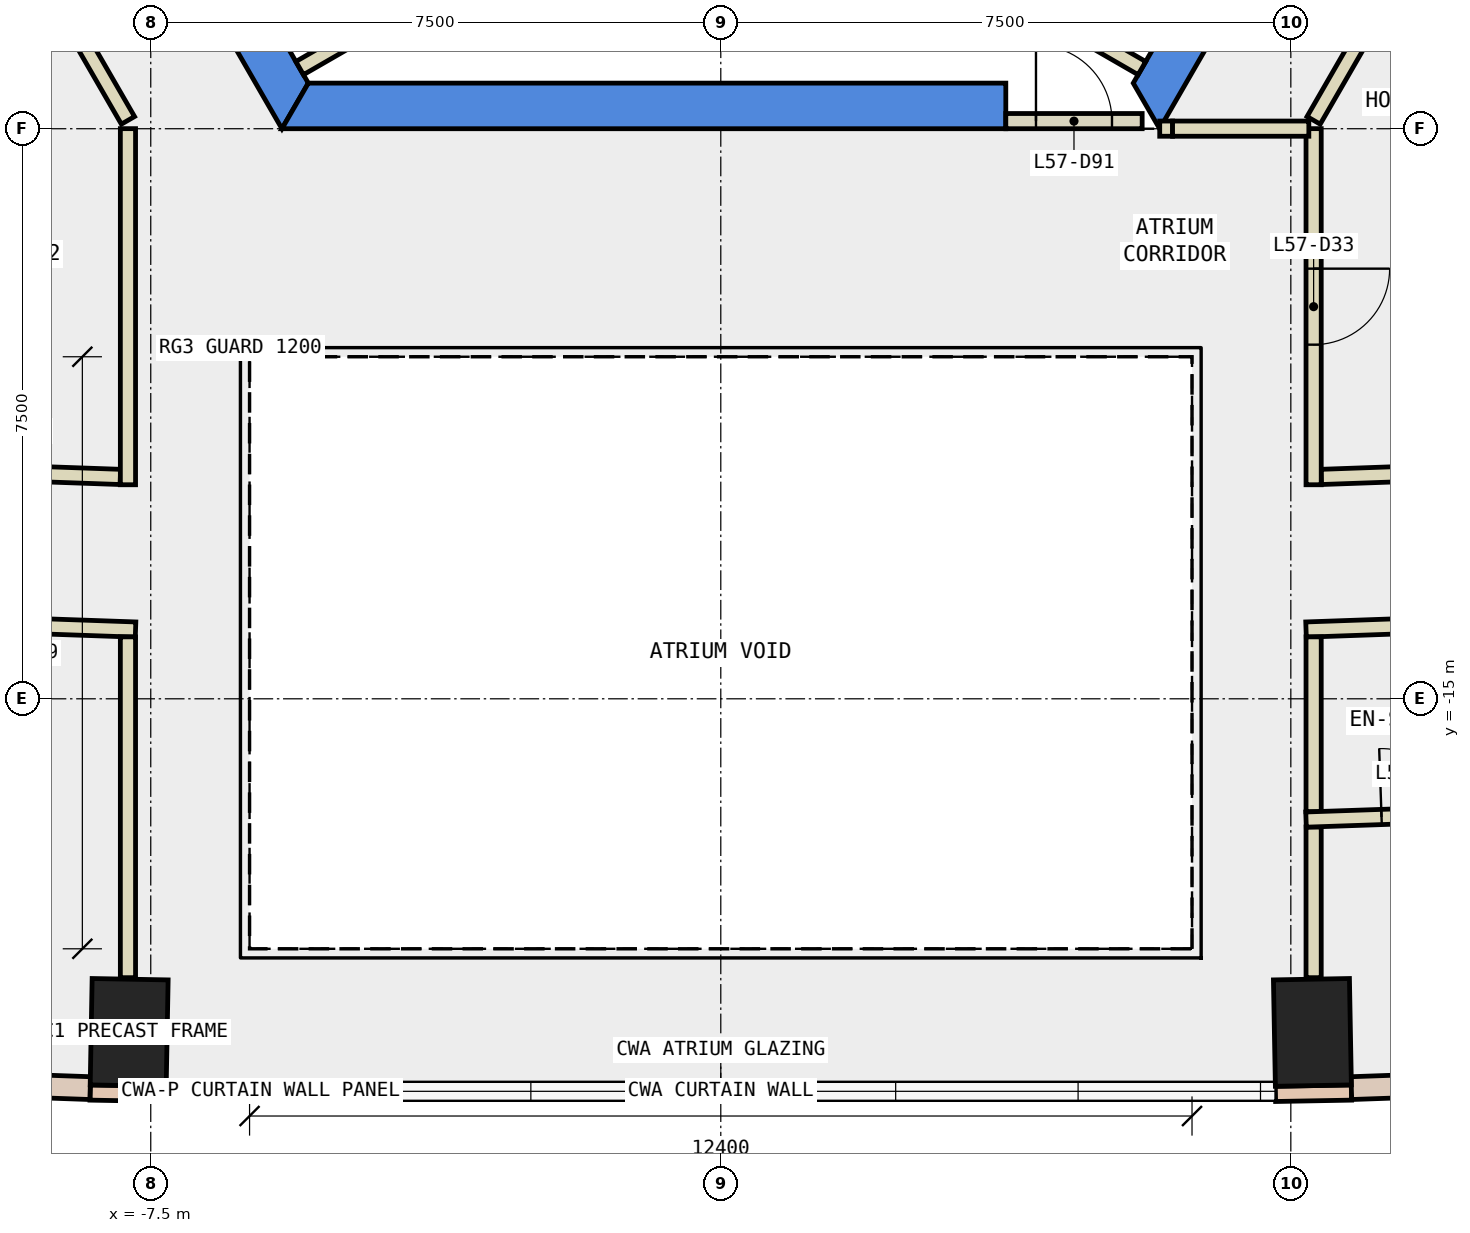
"""IFC4 building model, lengths in metres.
Left out: names, types, materials, properties, quantities, classifications, styles, units other than length and angle.
Written with IfcOpenShell. Run it as: python <this file> out.ifc"""

import sys

from ifc_helpers import new_model, si_unit, direction, frame, frame_2d, origin, origin_2d, place, context, subcontext, project, spatial, polyline, rectangle, outline, extrude, element, fill, save


model = new_model("IFC4")
c1 = context("Model", 3, precision=1e-05, world=origin(), true_north=direction((0.0, 1.0)))
c2 = subcontext(c1, "Body", "Model", "MODEL_VIEW")
j1 = project(units=[si_unit("LENGTHUNIT", "METRE"), si_unit("PLANEANGLEUNIT", "RADIAN")], contexts=[c1])
p1 = place(None, origin())
s1 = spatial("IfcSite", under=j1, at=p1, CompositionType="ELEMENT")
p2 = place(p1, origin())
s2 = spatial("IfcBuilding", under=s1, at=p2, CompositionType="ELEMENT")
p3 = place(p2, frame((0.0, 0.0, 252.2)))
s3 = spatial("IfcBuildingStorey", under=s2, at=p3, CompositionType="ELEMENT", Elevation=252.2)
for number, where, z_axis, x_axis in (
    (1, (-7.784, -19.389, -0.34), (0.0, 0.0, 1.0), (-1.0, 0.018, 0.0)),
    (2, (7.784, -19.389, -0.34), (0.0, 0.0, 1.0), (1.0, 0.018, 0.0)),
):
    element("IfcColumn", number, at=place(p3, frame(where, z_axis=z_axis, x_axis=x_axis)), inside=s3, PredefinedType="COLUMN", context=c2, shape_type="SweptSolid", body=[
        extrude(rectangle(XDim=1.0, YDim=1.4, at=origin_2d()), origin(), (0.0, 0.0, 1.0), 3.6),
    ])
p4 = place(p3, frame((0.0, 0.0, -0.34)))
e3 = element("IfcWall", 3, at=p4, inside=s3, PredefinedType="SHEAR", context=c2, shape_type="SweptSolid", body=[
    extrude(outline(polyline([(-11.547, 2.5), (-5.774, -7.5), (-5.427, -6.9), (-10.854, 2.5), (-11.547, 2.5)])), origin(), (0.0, 0.0, 1.0), 3.6),
])
p5 = place(p3, frame((0.0, 0.0, -0.34)))
e4 = element("IfcWall", 4, at=p5, inside=s3, PredefinedType="SHEAR", context=c2, shape_type="SweptSolid", body=[
    extrude(outline(polyline([(3.75, -7.5), (3.75, -6.9), (-5.427, -6.9), (-5.774, -7.5), (3.75, -7.5)])), origin(), (0.0, 0.0, 1.0), 3.6),
])
p6 = place(p3, frame((0.0, 0.0, -0.34)))
e5 = element("IfcWall", 5, at=p6, inside=s3, PredefinedType="SHEAR", context=c2, shape_type="SweptSolid", body=[
    extrude(outline(polyline([(5.774, -7.5), (11.547, 2.5), (10.854, 2.5), (5.427, -6.9), (5.774, -7.5)])), origin(), (0.0, 0.0, 1.0), 3.6),
])
for number, where, z_axis, x_axis in (
    (6, (7.578, -4.375, -0.34), (0.0, 0.0, 1.0), (0.866, -0.5, 0.0)),
    (7, (-7.578, -4.375, -0.34), (0.0, 0.0, 1.0), (-0.866, -0.5, 0.0)),
):
    element("IfcWall", number, at=place(p3, frame(where, z_axis=z_axis, x_axis=x_axis)), inside=s3, PredefinedType="SHEAR", context=c2, shape_type="SweptSolid", body=[
        extrude(rectangle(XDim=9.0, YDim=0.8, at=frame_2d((4.5, 0.0))), origin(), (0.0, 0.0, 1.0), 3.6),
    ])
for number, where, z_axis, x_axis in (
    (8, (-8.298, -20.18, 0.0), (0.0, 0.0, 1.0), (1.0, -0.018, 0.0)),
    (9, (7.298, -20.198, 0.0), (0.0, 0.0, 1.0), (1.0, 0.018, 0.0)),
):
    element("IfcWall", number, at=place(p3, frame(where, z_axis=z_axis, x_axis=x_axis)), inside=s3, PredefinedType="STANDARD", context=c2, shape_type="SweptSolid", body=[
        extrude(rectangle(XDim=1.0, YDim=0.2, at=frame_2d((0.5, 0.0))), origin(), (0.0, 0.0, 1.0), 3.26),
    ])
p7 = place(p3, frame((-15.952, -19.854, 0.0), z_axis=(0.0, 0.0, 1.0), x_axis=(0.999387577449, -0.034992428331, 0.0)))
e10 = element("IfcWall", 10, at=p7, inside=s3, PredefinedType="STANDARD", context=c2, shape_type="SweptSolid", body=[
    extrude(rectangle(XDim=7.661, YDim=0.3, at=frame_2d((3.83, 0.0))), origin(), (0.0, 0.0, 1.0), 3.26),
])
p8 = place(p7, frame((0.815, 0.0, 0.9)))
e11 = element("IfcOpeningElement", 11, at=p8, cuts=e10, PredefinedType="OPENING", context=c2, shape_type="SweptSolid", body=[
    extrude(rectangle(XDim=2.2, YDim=2.0, at=frame_2d((1.1, 1.0))), frame((0.0, 0.16, 0.0), z_axis=(0.0, -1.0, 0.0), x_axis=(1.0, 0.0, 0.0)), (0.0, 0.0, 1.0), 0.32),
])
p9 = place(p7, frame((4.646, 0.0, 0.9)))
e12 = element("IfcOpeningElement", 12, at=p9, cuts=e10, PredefinedType="OPENING", context=c2, shape_type="SweptSolid", body=[
    extrude(rectangle(XDim=2.2, YDim=2.0, at=frame_2d((1.1, 1.0))), frame((0.0, 0.16, 0.0), z_axis=(0.0, -1.0, 0.0), x_axis=(1.0, 0.0, 0.0)), (0.0, 0.0, 1.0), 0.32),
])
p10 = place(p3, frame((8.296, -20.122, 0.0), z_axis=(0.0, 0.0, 1.0), x_axis=(0.999387577449, 0.034992428331, 0.0)))
e13 = element("IfcWall", 13, at=p10, inside=s3, PredefinedType="STANDARD", context=c2, shape_type="SweptSolid", body=[
    extrude(rectangle(XDim=7.661, YDim=0.3, at=frame_2d((3.83, 0.0))), origin(), (0.0, 0.0, 1.0), 3.26),
])
p11 = place(p10, frame((0.815, 0.0, 0.9)))
e14 = element("IfcOpeningElement", 14, at=p11, cuts=e13, PredefinedType="OPENING", context=c2, shape_type="SweptSolid", body=[
    extrude(rectangle(XDim=2.2, YDim=2.0, at=frame_2d((1.1, 1.0))), frame((0.0, 0.16, 0.0), z_axis=(0.0, -1.0, 0.0), x_axis=(1.0, 0.0, 0.0)), (0.0, 0.0, 1.0), 0.32),
])
p12 = place(p10, frame((4.646, 0.0, 0.9)))
e15 = element("IfcOpeningElement", 15, at=p12, cuts=e13, PredefinedType="OPENING", context=c2, shape_type="SweptSolid", body=[
    extrude(rectangle(XDim=2.2, YDim=2.0, at=frame_2d((1.1, 1.0))), frame((0.0, 0.16, 0.0), z_axis=(0.0, -1.0, 0.0), x_axis=(1.0, 0.0, 0.0)), (0.0, 0.0, 1.0), 0.32),
])
p13 = place(p3, frame((7.9, -12.081, 0.0), z_axis=(0.0, 0.0, 1.0), x_axis=(0.999365240621, 0.035624652105, 0.0)))
e16 = element("IfcWall", 16, at=p13, inside=s3, PredefinedType="PARTITIONING", context=c2, shape_type="SweptSolid", body=[
    extrude(rectangle(XDim=1.042, YDim=0.2, at=frame_2d((0.521, 0.0))), origin(), (0.0, 0.0, 1.0), 3.26),
])
p14 = place(p3, frame((-7.8, -7.39, 0.0), z_axis=(0.0, 0.0, 1.0), x_axis=(-0.500266477503, 0.865871498253, 0.0)))
e17 = element("IfcWall", 17, at=p14, inside=s3, PredefinedType="PARTITIONING", context=c2, shape_type="SweptSolid", body=[
    extrude(rectangle(XDim=1.463, YDim=0.2, at=frame_2d((0.731, 0.0))), origin(), (0.0, 0.0, 1.0), 3.26),
])
p15 = place(p3, frame((-10.826, -11.978, 0.0), z_axis=(0.0, 0.0, 1.0), x_axis=(0.999380679818, -0.035188873332, 0.0)))
e18 = element("IfcWall", 18, at=p15, inside=s3, PredefinedType="PARTITIONING", context=c2, shape_type="SweptSolid", body=[
    extrude(rectangle(XDim=2.928, YDim=0.2, at=frame_2d((1.464, 0.0))), origin(), (0.0, 0.0, 1.0), 3.26),
])
p16 = place(p15, frame((0.964, 0.0, 0.0)))
e19 = element("IfcOpeningElement", 19, at=p16, cuts=e18, PredefinedType="OPENING", context=c2, shape_type="SweptSolid", body=[
    extrude(rectangle(XDim=1.0, YDim=2.1, at=frame_2d((0.5, 1.05))), frame((0.0, 0.11, 0.0), z_axis=(0.0, -1.0, 0.0), x_axis=(1.0, 0.0, 0.0)), (0.0, 0.0, 1.0), 0.22),
])
p17 = place(p3, frame((10.298, -13.998, 0.0), z_axis=(0.0, 0.0, 1.0), x_axis=(-0.999386321032, -0.035028293342, 0.0)))
e20 = element("IfcWall", 20, at=p17, inside=s3, PredefinedType="PARTITIONING", context=c2, shape_type="SweptSolid", body=[
    extrude(rectangle(XDim=2.6, YDim=0.2, at=frame_2d((1.3, 0.0))), origin(), (0.0, 0.0, 1.0), 3.26),
])
p18 = place(p3, frame((-7.7, -14.089, 0.0), z_axis=(0.0, 0.0, 1.0), x_axis=(-0.999388410674, 0.034968623214, 0.0)))
e21 = element("IfcWall", 21, at=p18, inside=s3, PredefinedType="PARTITIONING", context=c2, shape_type="SweptSolid", body=[
    extrude(rectangle(XDim=5.264, YDim=0.2, at=frame_2d((2.632, 0.0))), origin(), (0.0, 0.0, 1.0), 3.26),
])
p19 = place(p18, frame((2.182, 0.0, 0.0)))
e22 = element("IfcOpeningElement", 22, at=p19, cuts=e21, PredefinedType="OPENING", context=c2, shape_type="SweptSolid", body=[
    extrude(rectangle(XDim=1.0, YDim=2.1, at=frame_2d((0.5, 1.05))), frame((0.0, 0.11, 0.0), z_axis=(0.0, -1.0, 0.0), x_axis=(1.0, 0.0, 0.0)), (0.0, 0.0, 1.0), 0.22),
])
for number, where, z_axis, x_axis in (
    (23, (5.541, -6.703, 0.0), (0.0, 0.0, 1.0), (-0.866, 0.5, 0.0)),
    (24, (-4.588, -6.153, 0.0), (0.0, 0.0, 1.0), (-0.866, -0.5, 0.0)),
):
    element("IfcWall", number, at=place(p3, frame(where, z_axis=z_axis, x_axis=x_axis)), inside=s3, PredefinedType="PARTITIONING", context=c2, shape_type="SweptSolid", body=[
        extrude(rectangle(XDim=1.1, YDim=0.2, at=frame_2d((0.55, 0.0))), origin(), (0.0, 0.0, 1.0), 3.26),
    ])
p20 = place(p3, frame((5.775, -7.499, 0.0), z_axis=(0.0, 0.0, 1.0), x_axis=(1.0, 0.0, 0.0)))
e25 = element("IfcWall", 25, at=p20, inside=s3, PredefinedType="PARTITIONING", context=c2, shape_type="SweptSolid", body=[
    extrude(rectangle(XDim=0.169, YDim=0.2, at=frame_2d((0.084, 0.0))), origin(), (0.0, 0.0, 1.0), 2.4),
])
p21 = place(p3, frame((7.8, -7.39, 0.0), z_axis=(0.0, 0.0, 1.0), x_axis=(0.499977374825, 0.866038466041, 0.0)))
e26 = element("IfcWall", 26, at=p21, inside=s3, PredefinedType="PARTITIONING", context=c2, shape_type="SweptSolid", body=[
    extrude(rectangle(XDim=2.1, YDim=0.2, at=frame_2d((1.05, 0.0))), origin(), (0.0, 0.0, 1.0), 3.26),
])
p22 = place(p3, frame((7.8, -7.499, 0.0), z_axis=(0.0, 0.0, 1.0), x_axis=(0.0, -1.0, 0.0)))
e27 = element("IfcWall", 27, at=p22, inside=s3, PredefinedType="PARTITIONING", context=c2, shape_type="SweptSolid", body=[
    extrude(rectangle(XDim=4.685, YDim=0.2, at=frame_2d((2.343, 0.0))), origin(), (0.0, 0.0, 1.0), 3.26),
])
p23 = place(p22, frame((1.842, 0.0, 0.0)))
e28 = element("IfcOpeningElement", 28, at=p23, cuts=e27, PredefinedType="OPENING", context=c2, shape_type="SweptSolid", body=[
    extrude(rectangle(XDim=1.0, YDim=2.1, at=frame_2d((0.5, 1.05))), frame((0.0, 0.11, 0.0), z_axis=(0.0, -1.0, 0.0), x_axis=(1.0, 0.0, 0.0)), (0.0, 0.0, 1.0), 0.22),
])
p24 = place(p3, frame((-7.8, -12.184, 0.0), z_axis=(0.0, 0.0, 1.0), x_axis=(0.0, 1.0, 0.0)))
e29 = element("IfcWall", 29, at=p24, inside=s3, PredefinedType="PARTITIONING", context=c2, shape_type="SweptSolid", body=[
    extrude(rectangle(XDim=4.685, YDim=0.2, at=frame_2d((2.343, 0.0))), origin(), (0.0, 0.0, 1.0), 3.26),
])
p25 = place(p3, frame((7.8, -16.686, 0.0), z_axis=(0.0, 0.0, 1.0), x_axis=(0.0, -1.0, 0.0)))
e30 = element("IfcWall", 30, at=p25, inside=s3, PredefinedType="PARTITIONING", context=c2, shape_type="SweptSolid", body=[
    extrude(rectangle(XDim=1.983, YDim=0.2, at=frame_2d((0.991, 0.0))), origin(), (0.0, 0.0, 1.0), 3.26),
])
p26 = place(p3, frame((7.8, -14.185, 0.0), z_axis=(0.0, 0.0, 1.0), x_axis=(0.0, -1.0, 0.0)))
e31 = element("IfcWall", 31, at=p26, inside=s3, PredefinedType="PARTITIONING", context=c2, shape_type="SweptSolid", body=[
    extrude(rectangle(XDim=2.301, YDim=0.2, at=frame_2d((1.15, 0.0))), origin(), (0.0, 0.0, 1.0), 3.26),
])
p27 = place(p3, frame((-7.8, -18.669, 0.0), z_axis=(0.0, 0.0, 1.0), x_axis=(0.0, 1.0, 0.0)))
e32 = element("IfcWall", 32, at=p27, inside=s3, PredefinedType="PARTITIONING", context=c2, shape_type="SweptSolid", body=[
    extrude(rectangle(XDim=4.484, YDim=0.2, at=frame_2d((2.242, 0.0))), origin(), (0.0, 0.0, 1.0), 3.26),
])
p28 = place(p3, frame((-8.582, -6.036, 0.0), z_axis=(0.0, 0.0, 1.0), x_axis=(-0.897105141673, -0.441817116897, 0.0)))
e33 = element("IfcWall", 33, at=p28, inside=s3, PredefinedType="PARTITIONING", context=c2, shape_type="SweptSolid", body=[
    extrude(rectangle(XDim=5.111, YDim=0.2, at=frame_2d((2.555, 0.0))), origin(), (0.0, 0.0, 1.0), 3.26),
])
p29 = place(p3, frame((7.7, -16.589, 0.0), z_axis=(0.0, 0.0, 1.0), x_axis=(0.999410709261, 0.034325416459, 0.0)))
e34 = element("IfcWall", 34, at=p29, inside=s3, PredefinedType="PARTITIONING", context=c2, shape_type="SweptSolid", body=[
    extrude(rectangle(XDim=2.888, YDim=0.2, at=frame_2d((1.444, 0.0))), origin(), (0.0, 0.0, 1.0), 3.26),
])
p30 = place(p29, frame((0.994, 0.0, 0.0)))
e35 = element("IfcOpeningElement", 35, at=p30, cuts=e34, PredefinedType="OPENING", context=c2, shape_type="SweptSolid", body=[
    extrude(rectangle(XDim=0.9, YDim=2.1, at=frame_2d((0.45, 1.05))), frame((0.0, 0.11, 0.0), z_axis=(0.0, -1.0, 0.0), x_axis=(1.0, 0.0, 0.0)), (0.0, 0.0, 1.0), 0.22),
])
p31 = place(p3, frame((3.75, -7.4, 0.0), z_axis=(0.0, 0.0, 1.0), x_axis=(1.0, 0.0, 0.0)))
e36 = element("IfcWall", 36, at=p31, inside=s3, PredefinedType="PARTITIONING", context=c2, shape_type="SweptSolid", body=[
    extrude(rectangle(XDim=1.794, YDim=0.2, at=frame_2d((0.897, 0.0))), origin(), (0.0, 0.0, 1.0), 2.4),
])
p32 = place(p31, frame((0.397, 0.0, 0.0)))
e37 = element("IfcOpeningElement", 37, at=p32, cuts=e36, PredefinedType="OPENING", context=c2, shape_type="SweptSolid", body=[
    extrude(rectangle(XDim=1.0, YDim=2.1, at=frame_2d((0.5, 1.05))), frame((0.0, 0.11, 0.0), z_axis=(0.0, -1.0, 0.0), x_axis=(1.0, 0.0, 0.0)), (0.0, 0.0, 1.0), 0.22),
])
p33 = place(p3, frame((5.944, -7.499, 0.0), z_axis=(0.0, 0.0, 1.0), x_axis=(1.0, 0.0, 0.0)))
e38 = element("IfcWall", 38, at=p33, inside=s3, PredefinedType="PARTITIONING", context=c2, shape_type="SweptSolid", body=[
    extrude(rectangle(XDim=1.793, YDim=0.2, at=frame_2d((0.896, 0.0))), origin(), (0.0, 0.0, 1.0), 3.26),
])
p34 = place(p30, origin())
e39 = element("IfcDoor", 39, at=p34, inside=s3, OperationType="SINGLE_SWING_LEFT", PredefinedType="DOOR", context=c2, shape_type="SweptSolid", body=[
    extrude(rectangle(XDim=0.9, YDim=2.1, at=frame_2d((0.45, 1.05))), frame((0.0, 0.025, 0.0), z_axis=(0.0, -1.0, 0.0), x_axis=(1.0, 0.0, 0.0)), (0.0, 0.0, 1.0), 0.05),
])
fill(e35, e39)
p35 = place(p23, origin())
e40 = element("IfcDoor", 40, at=p35, inside=s3, OperationType="SINGLE_SWING_LEFT", PredefinedType="DOOR", context=c2, shape_type="SweptSolid", body=[
    extrude(rectangle(XDim=1.0, YDim=2.1, at=frame_2d((0.5, 1.05))), frame((0.0, 0.025, 0.0), z_axis=(0.0, -1.0, 0.0), x_axis=(1.0, 0.0, 0.0)), (0.0, 0.0, 1.0), 0.05),
])
fill(e28, e40)
p36 = place(p32, origin())
e41 = element("IfcDoor", 41, at=p36, inside=s3, OperationType="SINGLE_SWING_LEFT", PredefinedType="DOOR", context=c2, shape_type="SweptSolid", body=[
    extrude(rectangle(XDim=1.0, YDim=2.1, at=frame_2d((0.5, 1.05))), frame((0.0, 0.025, 0.0), z_axis=(0.0, -1.0, 0.0), x_axis=(1.0, 0.0, 0.0)), (0.0, 0.0, 1.0), 0.05),
])
fill(e37, e41)
save(model, sys.argv[1])
